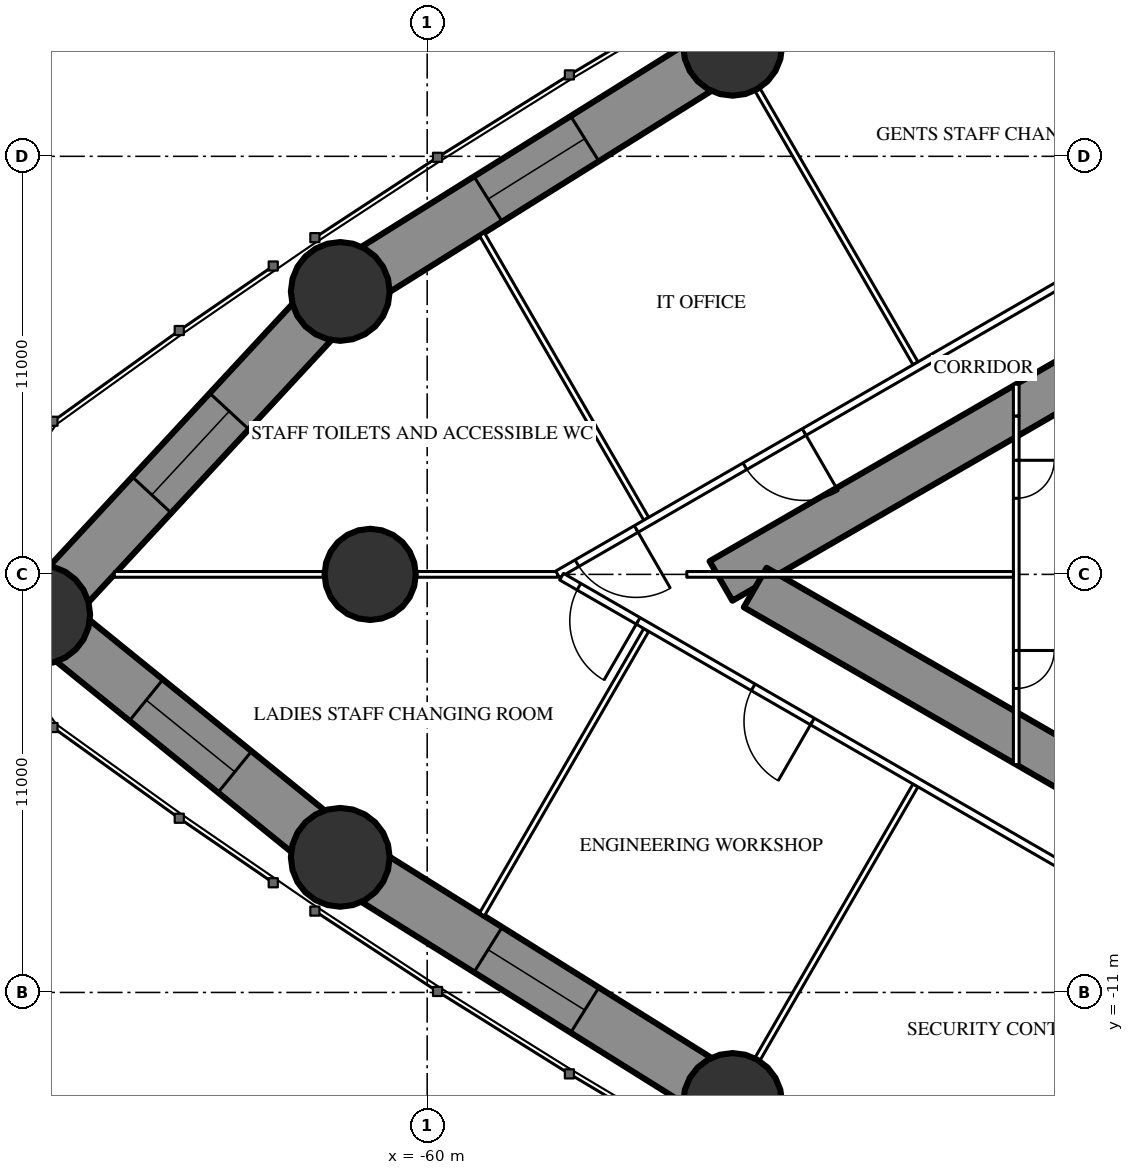
"""IFC4 building model, lengths in metres.
Left out: names, types, materials, properties, quantities, classifications, styles, units other than length and angle.
Written with IfcOpenShell. Run it as: python <this file> out.ifc"""

import sys

from ifc_helpers import new_model, si_unit, direction, frame, frame_2d, origin, origin_2d, place, context, subcontext, project, spatial, rectangle, circle, hollow_circle, extrude, element, fill, save


model = new_model("IFC4")
c1 = context("Model", 3, precision=1e-05, world=origin(), true_north=direction((0.0, 1.0)))
c2 = subcontext(c1, "Body", "Model", "MODEL_VIEW")
j1 = project(units=[si_unit("LENGTHUNIT", "METRE"), si_unit("PLANEANGLEUNIT", "RADIAN")], contexts=[c1])
p1 = place(None, origin())
s1 = spatial("IfcSite", under=j1, at=p1, CompositionType="ELEMENT")
p2 = place(p1, origin())
s2 = spatial("IfcBuilding", under=s1, at=p2, CompositionType="ELEMENT")
p3 = place(p2, frame((0.0, 0.0, 143.1)))
s3 = spatial("IfcBuildingStorey", under=s2, at=p3, CompositionType="ELEMENT", Elevation=143.1)
for number, where, z_axis, x_axis in (
    (1, (-70.168, -1.06, 0.0), (0.0, 0.0, 1.0), (1.0, 0.0, 0.0)),
    (2, (-62.287, -7.445, 0.0), (0.0, 0.0, 1.0), (1.0, 0.0, 0.0)),
    (3, (-51.963, -13.895, 0.0), (0.0, 0.0, 1.0), (1.0, 0.0, 0.0)),
    (4, (-51.963, 13.895, 0.0), (0.0, 0.0, 1.0), (1.0, 0.0, 0.0)),
    (5, (-62.287, 7.445, 0.0), (0.0, 0.0, 1.0), (1.0, 0.0, 0.0)),
):
    element("IfcColumn", number, at=place(p3, frame(where, z_axis=z_axis, x_axis=x_axis)), inside=s3, PredefinedType="COLUMN", context=c2, shape_type="SweptSolid", body=[
        extrude(hollow_circle(Radius=1.3, WallThickness=0.1, at=origin_2d()), origin(), (0.0, 0.0, 1.0), 3.6),
    ])
p4 = place(p3, frame((-61.5, 0.0, 0.0), z_axis=(0.0, 0.0, 1.0), x_axis=(1.0, 0.0, 0.0)))
e6 = element("IfcColumn", 6, at=p4, inside=s3, PredefinedType="COLUMN", context=c2, shape_type="SweptSolid", body=[
    extrude(circle(Radius=1.2, at=origin_2d()), origin(), (0.0, 0.0, 1.0), 3.6),
])
p5 = place(p3, frame((-27.2, 14.3, 0.0), z_axis=(0.0, 0.0, 1.0), x_axis=(-0.866026593062, -0.499997940104, 0.0)))
e7 = element("IfcWall", 7, at=p5, inside=s3, PredefinedType="SHEAR", context=c2, shape_type="SweptSolid", body=[
    extrude(rectangle(XDim=28.946, YDim=1.2, at=frame_2d((14.473, 0.0))), origin(), (0.0, 0.0, 1.0), 3.6),
])
p6 = place(p5, frame((4.6, 0.0, 0.0)))
e8 = element("IfcOpeningElement", 8, at=p6, cuts=e7, PredefinedType="OPENING", context=c2, shape_type="SweptSolid", body=[
    extrude(rectangle(XDim=1.0, YDim=2.2, at=frame_2d((0.5, 1.1))), frame((0.0, 0.61, 0.0), z_axis=(0.0, -1.0, 0.0), x_axis=(1.0, 0.0, 0.0)), (0.0, 0.0, 1.0), 1.22),
])
p7 = place(p5, frame((14.545, 0.0, 0.0)))
e9 = element("IfcOpeningElement", 9, at=p7, cuts=e7, PredefinedType="OPENING", context=c2, shape_type="SweptSolid", body=[
    extrude(rectangle(XDim=1.8, YDim=2.2, at=frame_2d((0.9, 1.1))), frame((0.0, 0.61, 0.0), z_axis=(0.0, -1.0, 0.0), x_axis=(1.0, 0.0, 0.0)), (0.0, 0.0, 1.0), 1.22),
])
p8 = place(p3, frame((-27.2, -14.3, 0.0), z_axis=(0.0, 0.0, 1.0), x_axis=(-0.866024021859, 0.500002393557, 0.0)))
e10 = element("IfcWall", 10, at=p8, inside=s3, PredefinedType="SHEAR", context=c2, shape_type="SweptSolid", body=[
    extrude(rectangle(XDim=27.907, YDim=1.2, at=frame_2d((13.954, 0.0))), origin(), (0.0, 0.0, 1.0), 3.6),
])
p9 = place(p8, frame((4.6, 0.0, 0.0)))
e11 = element("IfcOpeningElement", 11, at=p9, cuts=e10, PredefinedType="OPENING", context=c2, shape_type="SweptSolid", body=[
    extrude(rectangle(XDim=1.0, YDim=2.2, at=frame_2d((0.5, 1.1))), frame((0.0, 0.61, 0.0), z_axis=(0.0, -1.0, 0.0), x_axis=(1.0, 0.0, 0.0)), (0.0, 0.0, 1.0), 1.22),
])
p10 = place(p8, frame((13.845, 0.0, 0.0)))
e12 = element("IfcOpeningElement", 12, at=p10, cuts=e10, PredefinedType="OPENING", context=c2, shape_type="SweptSolid", body=[
    extrude(rectangle(XDim=1.8, YDim=2.2, at=frame_2d((0.9, 1.1))), frame((0.0, 0.61, 0.0), z_axis=(0.0, -1.0, 0.0), x_axis=(1.0, 0.0, 0.0)), (0.0, 0.0, 1.0), 1.22),
])
p11 = place(p3, frame((-41.245, 19.666, 0.0), z_axis=(0.0, 0.0, 1.0), x_axis=(-0.880492350889, -0.474060354835, 0.0)))
e13 = element("IfcWall", 13, at=p11, inside=s3, PredefinedType="SHEAR", context=c2, shape_type="SweptSolid", body=[
    extrude(rectangle(XDim=12.173, YDim=1.4, at=frame_2d((6.086, 0.0))), origin(), (0.0, 0.0, 1.0), 3.6),
])
p12 = place(p11, frame((4.586, 0.0, 0.6)))
e14 = element("IfcOpeningElement", 14, at=p12, cuts=e13, PredefinedType="OPENING", context=c2, shape_type="SweptSolid", body=[
    extrude(rectangle(XDim=3.0, YDim=1.2, at=frame_2d((1.5, 0.6))), frame((0.0, 0.71, 0.0), z_axis=(0.0, -1.0, 0.0), x_axis=(1.0, 0.0, 0.0)), (0.0, 0.0, 1.0), 1.42),
])
p13 = place(p3, frame((-51.963, 13.895, 0.0), z_axis=(0.0, 0.0, 1.0), x_axis=(-0.848062521637, -0.529896177939, 0.0)))
e15 = element("IfcWall", 15, at=p13, inside=s3, PredefinedType="SHEAR", context=c2, shape_type="SweptSolid", body=[
    extrude(rectangle(XDim=12.173, YDim=1.4, at=frame_2d((6.086, 0.0))), origin(), (0.0, 0.0, 1.0), 3.6),
])
p14 = place(p13, frame((4.586, 0.0, 0.6)))
e16 = element("IfcOpeningElement", 16, at=p14, cuts=e15, PredefinedType="OPENING", context=c2, shape_type="SweptSolid", body=[
    extrude(rectangle(XDim=3.0, YDim=1.2, at=frame_2d((1.5, 0.6))), frame((0.0, 0.71, 0.0), z_axis=(0.0, -1.0, 0.0), x_axis=(1.0, 0.0, 0.0)), (0.0, 0.0, 1.0), 1.42),
])
p15 = place(p3, frame((-62.287, 7.445, 0.0), z_axis=(0.0, 0.0, 1.0), x_axis=(-0.679718253794, -0.733473309303, 0.0)))
e17 = element("IfcWall", 17, at=p15, inside=s3, PredefinedType="SHEAR", context=c2, shape_type="SweptSolid", body=[
    extrude(rectangle(XDim=11.595, YDim=1.4, at=frame_2d((5.797, 0.0))), origin(), (0.0, 0.0, 1.0), 3.6),
])
p16 = place(p15, frame((4.298, 0.0, 0.6)))
e18 = element("IfcOpeningElement", 18, at=p16, cuts=e17, PredefinedType="OPENING", context=c2, shape_type="SweptSolid", body=[
    extrude(rectangle(XDim=3.0, YDim=1.2, at=frame_2d((1.5, 0.6))), frame((0.0, 0.71, 0.0), z_axis=(0.0, -1.0, 0.0), x_axis=(1.0, 0.0, 0.0)), (0.0, 0.0, 1.0), 1.42),
])
p17 = place(p3, frame((-70.168, -1.06, 0.0), z_axis=(0.0, 0.0, 1.0), x_axis=(0.777033503891, -0.629459239213, 0.0)))
e19 = element("IfcWall", 19, at=p17, inside=s3, PredefinedType="SHEAR", context=c2, shape_type="SweptSolid", body=[
    extrude(rectangle(XDim=10.143, YDim=1.4, at=frame_2d((5.071, 0.0))), origin(), (0.0, 0.0, 1.0), 3.6),
])
p18 = place(p17, frame((3.572, 0.0, 0.6)))
e20 = element("IfcOpeningElement", 20, at=p18, cuts=e19, PredefinedType="OPENING", context=c2, shape_type="SweptSolid", body=[
    extrude(rectangle(XDim=3.0, YDim=1.2, at=frame_2d((1.5, 0.6))), frame((0.0, 0.71, 0.0), z_axis=(0.0, -1.0, 0.0), x_axis=(1.0, 0.0, 0.0)), (0.0, 0.0, 1.0), 1.42),
])
p19 = place(p3, frame((-62.287, -7.445, 0.0), z_axis=(0.0, 0.0, 1.0), x_axis=(0.848062521637, -0.529896177939, 0.0)))
e21 = element("IfcWall", 21, at=p19, inside=s3, PredefinedType="SHEAR", context=c2, shape_type="SweptSolid", body=[
    extrude(rectangle(XDim=12.173, YDim=1.4, at=frame_2d((6.086, 0.0))), origin(), (0.0, 0.0, 1.0), 3.6),
])
p20 = place(p19, frame((4.586, 0.0, 0.6)))
e22 = element("IfcOpeningElement", 22, at=p20, cuts=e21, PredefinedType="OPENING", context=c2, shape_type="SweptSolid", body=[
    extrude(rectangle(XDim=3.0, YDim=1.2, at=frame_2d((1.5, 0.6))), frame((0.0, 0.71, 0.0), z_axis=(0.0, -1.0, 0.0), x_axis=(1.0, 0.0, 0.0)), (0.0, 0.0, 1.0), 1.42),
])
p21 = place(p3, frame((-51.963, -13.895, 0.0), z_axis=(0.0, 0.0, 1.0), x_axis=(0.880492350889, -0.474060354835, 0.0)))
e23 = element("IfcWall", 23, at=p21, inside=s3, PredefinedType="SHEAR", context=c2, shape_type="SweptSolid", body=[
    extrude(rectangle(XDim=12.173, YDim=1.4, at=frame_2d((6.086, 0.0))), origin(), (0.0, 0.0, 1.0), 3.6),
])
p22 = place(p21, frame((4.586, 0.0, 0.6)))
e24 = element("IfcOpeningElement", 24, at=p22, cuts=e23, PredefinedType="OPENING", context=c2, shape_type="SweptSolid", body=[
    extrude(rectangle(XDim=3.0, YDim=1.2, at=frame_2d((1.5, 0.6))), frame((0.0, 0.71, 0.0), z_axis=(0.0, -1.0, 0.0), x_axis=(1.0, 0.0, 0.0)), (0.0, 0.0, 1.0), 1.42),
])
p23 = place(p3, frame((-47.151, 5.552, 0.0), z_axis=(0.0, 0.0, 1.0), x_axis=(-0.500003012045, 0.866023664773, 0.0)))
e25 = element("IfcWall", 25, at=p23, inside=s3, PredefinedType="PARTITIONING", context=c2, shape_type="SweptSolid", body=[
    extrude(rectangle(XDim=8.311, YDim=0.15, at=frame_2d((4.156, 0.0))), origin(), (0.0, 0.0, 1.0), 2.15),
])
p24 = place(p3, frame((-54.236, 1.462, 0.0), z_axis=(0.0, 0.0, 1.0), x_axis=(-0.499999505331, 0.866025689381, 0.0)))
e26 = element("IfcWall", 26, at=p24, inside=s3, PredefinedType="PARTITIONING", context=c2, shape_type="SweptSolid", body=[
    extrude(rectangle(XDim=8.645, YDim=0.15, at=frame_2d((4.323, 0.0))), origin(), (0.0, 0.0, 1.0), 3.35),
])
p25 = place(p3, frame((-47.151, -5.552, 0.0), z_axis=(0.0, 0.0, 1.0), x_axis=(-0.500003012045, -0.866023664773, 0.0)))
e27 = element("IfcWall", 27, at=p25, inside=s3, PredefinedType="PARTITIONING", context=c2, shape_type="SweptSolid", body=[
    extrude(rectangle(XDim=8.311, YDim=0.15, at=frame_2d((4.156, 0.0))), origin(), (0.0, 0.0, 1.0), 2.15),
])
p26 = place(p3, frame((-54.236, -1.462, 0.0), z_axis=(0.0, 0.0, 1.0), x_axis=(-0.499999505331, -0.866025689381, 0.0)))
e28 = element("IfcWall", 28, at=p26, inside=s3, PredefinedType="PARTITIONING", context=c2, shape_type="SweptSolid", body=[
    extrude(rectangle(XDim=8.645, YDim=0.15, at=frame_2d((4.323, 0.0))), origin(), (0.0, 0.0, 1.0), 3.35),
])
p27 = place(p3, frame((-56.568, 0.0, 0.0), z_axis=(0.0, 0.0, 1.0), x_axis=(-1.0, 0.0, 0.0)))
e29 = element("IfcWall", 29, at=p27, inside=s3, PredefinedType="PARTITIONING", context=c2, shape_type="SweptSolid", body=[
    extrude(rectangle(XDim=11.663, YDim=0.15, at=frame_2d((5.832, 0.0))), origin(), (0.0, 0.0, 1.0), 2.15),
])
p28 = place(p3, frame((-37.7, 10.894, 0.0), z_axis=(0.0, 0.0, 1.0), x_axis=(-0.866027905338, -0.499995667157, 0.0)))
e30 = element("IfcWall", 30, at=p28, inside=s3, PredefinedType="PARTITIONING", context=c2, shape_type="SweptSolid", body=[
    extrude(rectangle(XDim=21.787, YDim=0.2, at=frame_2d((10.894, 0.0))), origin(), (0.0, 0.0, 1.0), 3.35),
])
p29 = place(p28, frame((14.296, 0.0, 0.0)))
e31 = element("IfcOpeningElement", 31, at=p29, cuts=e30, PredefinedType="OPENING", context=c2, shape_type="SweptSolid", body=[
    extrude(rectangle(XDim=1.8, YDim=2.2, at=frame_2d((0.9, 1.1))), frame((0.0, 0.11, 0.0), z_axis=(0.0, -1.0, 0.0), x_axis=(1.0, 0.0, 0.0)), (0.0, 0.0, 1.0), 0.22),
])
p30 = place(p28, frame((19.399, 0.0, 0.0)))
e32 = element("IfcOpeningElement", 32, at=p30, cuts=e30, PredefinedType="OPENING", context=c2, shape_type="SweptSolid", body=[
    extrude(rectangle(XDim=1.8, YDim=2.14, at=frame_2d((0.9, 1.07))), frame((0.0, 0.11, 0.0), z_axis=(0.0, -1.0, 0.0), x_axis=(1.0, 0.0, 0.0)), (0.0, 0.0, 1.0), 0.22),
])
p31 = place(p28, frame((4.64, 0.0, 0.0)))
e33 = element("IfcOpeningElement", 33, at=p31, cuts=e30, PredefinedType="OPENING", context=c2, shape_type="SweptSolid", body=[
    extrude(rectangle(XDim=1.8, YDim=2.2, at=frame_2d((0.9, 1.1))), frame((0.0, 0.11, 0.0), z_axis=(0.0, -1.0, 0.0), x_axis=(1.0, 0.0, 0.0)), (0.0, 0.0, 1.0), 0.22),
])
p32 = place(p3, frame((-36.92, -11.344, 0.0), z_axis=(0.0, 0.0, 1.0), x_axis=(-0.866028313256, 0.499994960614, 0.0)))
e34 = element("IfcWall", 34, at=p32, inside=s3, PredefinedType="PARTITIONING", context=c2, shape_type="SweptSolid", body=[
    extrude(rectangle(XDim=22.568, YDim=0.2, at=frame_2d((11.284, 0.0))), origin(), (0.0, 0.0, 1.0), 3.35),
])
p33 = place(p32, frame((20.24, 0.0, 0.0)))
e35 = element("IfcOpeningElement", 35, at=p33, cuts=e34, PredefinedType="OPENING", context=c2, shape_type="SweptSolid", body=[
    extrude(rectangle(XDim=1.8, YDim=2.14, at=frame_2d((0.9, 1.07))), frame((0.0, 0.11, 0.0), z_axis=(0.0, -1.0, 0.0), x_axis=(1.0, 0.0, 0.0)), (0.0, 0.0, 1.0), 0.22),
])
p34 = place(p32, frame((14.946, 0.0, 0.0)))
e36 = element("IfcOpeningElement", 36, at=p34, cuts=e34, PredefinedType="OPENING", context=c2, shape_type="SweptSolid", body=[
    extrude(rectangle(XDim=1.8, YDim=2.2, at=frame_2d((0.9, 1.1))), frame((0.0, 0.11, 0.0), z_axis=(0.0, -1.0, 0.0), x_axis=(1.0, 0.0, 0.0)), (0.0, 0.0, 1.0), 0.22),
])
p35 = place(p32, frame((5.091, 0.0, 0.0)))
e37 = element("IfcOpeningElement", 37, at=p35, cuts=e34, PredefinedType="OPENING", context=c2, shape_type="SweptSolid", body=[
    extrude(rectangle(XDim=1.8, YDim=2.2, at=frame_2d((0.9, 1.1))), frame((0.0, 0.11, 0.0), z_axis=(0.0, -1.0, 0.0), x_axis=(1.0, 0.0, 0.0)), (0.0, 0.0, 1.0), 0.22),
])
p36 = place(p3, frame((-44.5, 4.169, 0.0), z_axis=(0.0, 0.0, 1.0), x_axis=(0.0, -1.0, 0.0)))
e38 = element("IfcWall", 38, at=p36, inside=s3, PredefinedType="PARTITIONING", context=c2, shape_type="SweptSolid", body=[
    extrude(rectangle(XDim=9.173, YDim=0.15, at=frame_2d((4.587, 0.0))), origin(), (0.0, 0.0, 1.0), 3.35),
])
p37 = place(p36, frame((1.167, 0.0, 0.0)))
e39 = element("IfcOpeningElement", 39, at=p37, cuts=e38, PredefinedType="OPENING", context=c2, shape_type="SweptSolid", body=[
    extrude(rectangle(XDim=1.0, YDim=2.2, at=frame_2d((0.5, 1.1))), frame((0.0, 0.085, 0.0), z_axis=(0.0, -1.0, 0.0), x_axis=(1.0, 0.0, 0.0)), (0.0, 0.0, 1.0), 0.17),
])
p38 = place(p36, frame((6.171, 0.0, 0.0)))
e40 = element("IfcOpeningElement", 40, at=p38, cuts=e38, PredefinedType="OPENING", context=c2, shape_type="SweptSolid", body=[
    extrude(rectangle(XDim=1.0, YDim=2.2, at=frame_2d((0.5, 1.1))), frame((0.0, 0.085, 0.0), z_axis=(0.0, -1.0, 0.0), x_axis=(1.0, 0.0, 0.0)), (0.0, 0.0, 1.0), 0.17),
])
p39 = place(p3, frame((-44.575, 0.0, 0.0), z_axis=(0.0, 0.0, 1.0), x_axis=(-1.0, 0.0, 0.0)))
e41 = element("IfcWall", 41, at=p39, inside=s3, PredefinedType="PARTITIONING", context=c2, shape_type="SweptSolid", body=[
    extrude(rectangle(XDim=8.593, YDim=0.15, at=frame_2d((4.297, 0.0))), origin(), (0.0, 0.0, 1.0), 2.15),
])
p40 = place(p3, frame((-44.5, 5.005, 0.0), z_axis=(0.0, 0.0, 1.0), x_axis=(0.0, -1.0, 0.0)))
e42 = element("IfcWall", 42, at=p40, inside=s3, PredefinedType="PARTITIONING", context=c2, shape_type="SweptSolid", body=[
    extrude(rectangle(XDim=0.836, YDim=0.15, at=frame_2d((0.418, 0.0))), origin(), (0.0, 0.0, 1.0), 2.15),
])
p41 = place(p14, origin())
e43 = element("IfcWindow", 43, at=p41, inside=s3, PartitioningType="SINGLE_PANEL", PredefinedType="WINDOW", context=c2, shape_type="SweptSolid", body=[
    extrude(rectangle(XDim=3.0, YDim=1.2, at=frame_2d((1.5, 0.6))), frame((0.0, 0.03, 0.0), z_axis=(0.0, -1.0, 0.0), x_axis=(1.0, 0.0, 0.0)), (0.0, 0.0, 1.0), 0.06),
])
fill(e16, e43)
p42 = place(p16, origin())
e44 = element("IfcWindow", 44, at=p42, inside=s3, PartitioningType="SINGLE_PANEL", PredefinedType="WINDOW", context=c2, shape_type="SweptSolid", body=[
    extrude(rectangle(XDim=3.0, YDim=1.2, at=frame_2d((1.5, 0.6))), frame((0.0, 0.03, 0.0), z_axis=(0.0, -1.0, 0.0), x_axis=(1.0, 0.0, 0.0)), (0.0, 0.0, 1.0), 0.06),
])
fill(e18, e44)
p43 = place(p18, origin())
e45 = element("IfcWindow", 45, at=p43, inside=s3, PartitioningType="SINGLE_PANEL", PredefinedType="WINDOW", context=c2, shape_type="SweptSolid", body=[
    extrude(rectangle(XDim=3.0, YDim=1.2, at=frame_2d((1.5, 0.6))), frame((0.0, 0.03, 0.0), z_axis=(0.0, -1.0, 0.0), x_axis=(1.0, 0.0, 0.0)), (0.0, 0.0, 1.0), 0.06),
])
fill(e20, e45)
p44 = place(p20, origin())
e46 = element("IfcWindow", 46, at=p44, inside=s3, PartitioningType="SINGLE_PANEL", PredefinedType="WINDOW", context=c2, shape_type="SweptSolid", body=[
    extrude(rectangle(XDim=3.0, YDim=1.2, at=frame_2d((1.5, 0.6))), frame((0.0, 0.03, 0.0), z_axis=(0.0, -1.0, 0.0), x_axis=(1.0, 0.0, 0.0)), (0.0, 0.0, 1.0), 0.06),
])
fill(e22, e46)
p45 = place(p29, origin())
e47 = element("IfcDoor", 47, at=p45, inside=s3, OperationType="DOUBLE_DOOR_SINGLE_SWING", PredefinedType="DOOR", context=c2, shape_type="SweptSolid", body=[
    extrude(rectangle(XDim=1.8, YDim=2.2, at=frame_2d((0.9, 1.1))), frame((0.0, 0.025, 0.0), z_axis=(0.0, -1.0, 0.0), x_axis=(1.0, 0.0, 0.0)), (0.0, 0.0, 1.0), 0.05),
])
fill(e31, e47)
p46 = place(p30, origin())
e48 = element("IfcDoor", 48, at=p46, inside=s3, OperationType="DOUBLE_DOOR_SINGLE_SWING", PredefinedType="DOOR", context=c2, shape_type="SweptSolid", body=[
    extrude(rectangle(XDim=1.8, YDim=2.14, at=frame_2d((0.9, 1.07))), frame((0.0, 0.025, 0.0), z_axis=(0.0, -1.0, 0.0), x_axis=(1.0, 0.0, 0.0)), (0.0, 0.0, 1.0), 0.05),
])
fill(e32, e48)
p47 = place(p33, origin())
e49 = element("IfcDoor", 49, at=p47, inside=s3, OperationType="DOUBLE_DOOR_SINGLE_SWING", PredefinedType="DOOR", context=c2, shape_type="SweptSolid", body=[
    extrude(rectangle(XDim=1.8, YDim=2.14, at=frame_2d((0.9, 1.07))), frame((0.0, 0.025, 0.0), z_axis=(0.0, -1.0, 0.0), x_axis=(1.0, 0.0, 0.0)), (0.0, 0.0, 1.0), 0.05),
])
fill(e35, e49)
p48 = place(p34, origin())
e50 = element("IfcDoor", 50, at=p48, inside=s3, OperationType="DOUBLE_DOOR_SINGLE_SWING", PredefinedType="DOOR", context=c2, shape_type="SweptSolid", body=[
    extrude(rectangle(XDim=1.8, YDim=2.2, at=frame_2d((0.9, 1.1))), frame((0.0, 0.025, 0.0), z_axis=(0.0, -1.0, 0.0), x_axis=(1.0, 0.0, 0.0)), (0.0, 0.0, 1.0), 0.05),
])
fill(e36, e50)
p49 = place(p37, origin())
e51 = element("IfcDoor", 51, at=p49, inside=s3, OperationType="SINGLE_SWING_LEFT", PredefinedType="DOOR", context=c2, shape_type="SweptSolid", body=[
    extrude(rectangle(XDim=1.0, YDim=2.2, at=frame_2d((0.5, 1.1))), frame((0.0, 0.025, 0.0), z_axis=(0.0, -1.0, 0.0), x_axis=(1.0, 0.0, 0.0)), (0.0, 0.0, 1.0), 0.05),
])
fill(e39, e51)
p50 = place(p38, origin())
e52 = element("IfcDoor", 52, at=p50, inside=s3, OperationType="SINGLE_SWING_LEFT", PredefinedType="DOOR", context=c2, shape_type="SweptSolid", body=[
    extrude(rectangle(XDim=1.0, YDim=2.2, at=frame_2d((0.5, 1.1))), frame((0.0, 0.025, 0.0), z_axis=(0.0, -1.0, 0.0), x_axis=(1.0, 0.0, 0.0)), (0.0, 0.0, 1.0), 0.05),
])
fill(e40, e52)
save(model, sys.argv[1])
